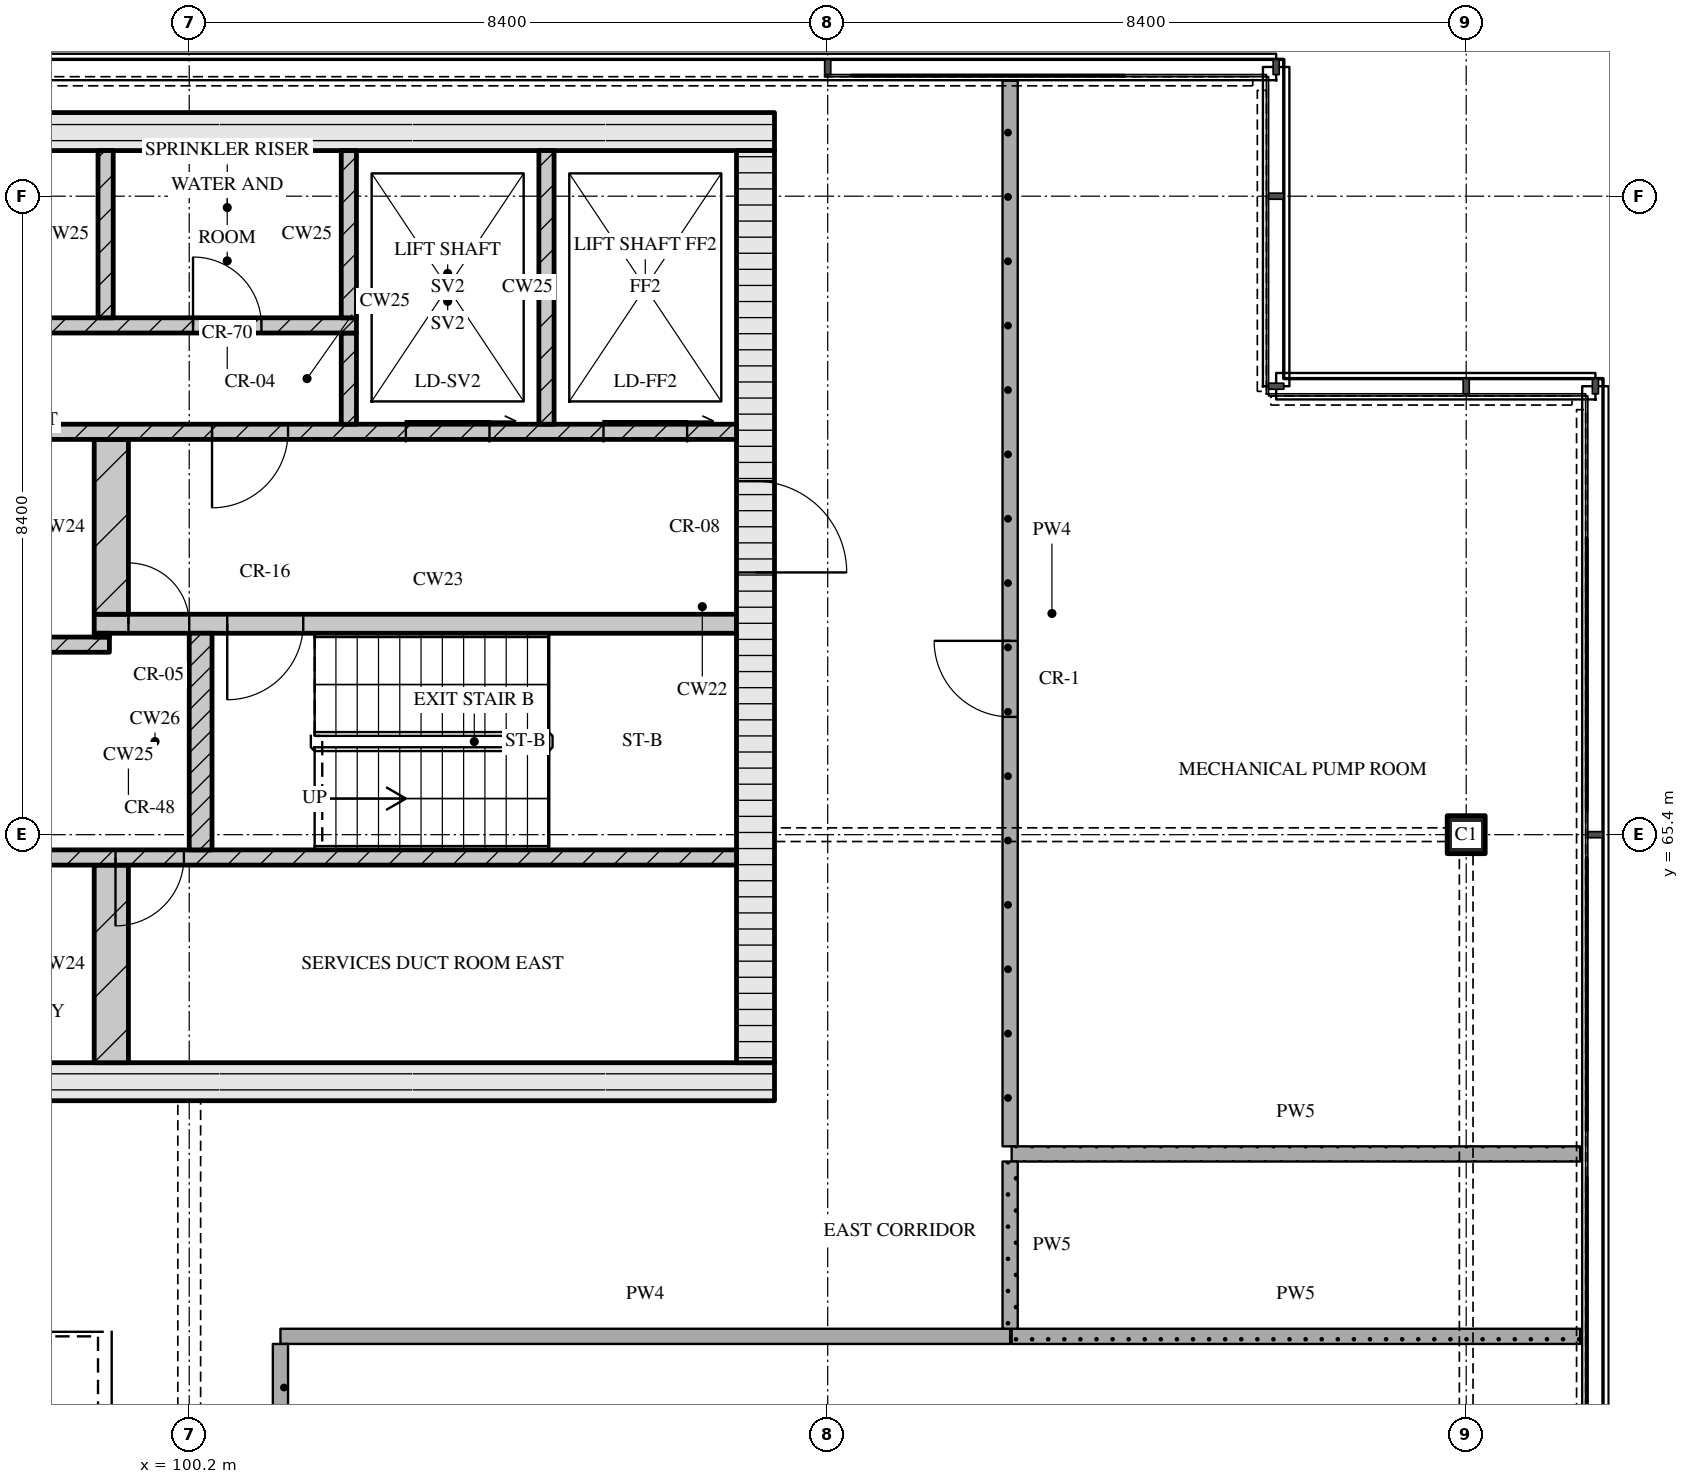
"""IFC4 building model, lengths in metres.
Left out: names, types, materials, properties, quantities, classifications, styles, units other than length and angle.
Written with IfcOpenShell. Run it as: python <this file> out.ifc"""

import sys

from ifc_helpers import new_model, si_unit, direction, frame, frame_2d, origin, origin_2d, place, context, subcontext, project, spatial, rectangle, extrude, element, fill, save


model = new_model("IFC4")
c1 = context("Model", 3, precision=1e-05, world=origin(), true_north=direction((0.0, 1.0)))
c2 = subcontext(c1, "Body", "Model", "MODEL_VIEW")
j1 = project(units=[si_unit("LENGTHUNIT", "METRE"), si_unit("PLANEANGLEUNIT", "RADIAN")], contexts=[c1])
p1 = place(None, origin())
s1 = spatial("IfcSite", under=j1, at=p1, CompositionType="ELEMENT")
p2 = place(p1, origin())
s2 = spatial("IfcBuilding", under=s1, at=p2, CompositionType="ELEMENT")
p3 = place(p2, frame((0.0, 0.0, 310.35)))
s3 = spatial("IfcBuildingStorey", under=s2, at=p3, CompositionType="ELEMENT", Elevation=310.35)
p4 = place(p3, frame((117.0, 65.4, 0.0), z_axis=(0.0, 0.0, 1.0), x_axis=(1.0, 0.0, 0.0)))
e1 = element("IfcColumn", 1, at=p4, inside=s3, PredefinedType="COLUMN", context=c2, shape_type="SweptSolid", body=[
    extrude(rectangle(XDim=0.5, YDim=0.5, at=origin_2d()), origin(), (0.0, 0.0, 1.0), 4.5),
])
p5 = place(p3, frame((67.3, 62.15, 0.0), z_axis=(0.0, 0.0, 1.0), x_axis=(1.0, 0.0, 0.0)))
e2 = element("IfcWall", 2, at=p5, inside=s3, PredefinedType="SOLIDWALL", context=c2, shape_type="SweptSolid", body=[
    extrude(rectangle(XDim=40.6, YDim=0.5, at=frame_2d((20.3, 0.0))), origin(), (0.0, 0.0, 1.0), 4.2),
])
p6 = place(p5, frame((20.65, 0.0, 0.0)))
e3 = element("IfcOpeningElement", 3, at=p6, cuts=e2, PredefinedType="OPENING", context=c2, shape_type="SweptSolid", body=[
    extrude(rectangle(XDim=1.8, YDim=2.1, at=frame_2d((0.9, 1.05))), frame((0.0, 0.26, 0.0), z_axis=(0.0, -1.0, 0.0), x_axis=(1.0, 0.0, 0.0)), (0.0, 0.0, 1.0), 0.52),
])
p7 = place(p3, frame((67.3, 74.65, 0.0), z_axis=(0.0, 0.0, 1.0), x_axis=(1.0, 0.0, 0.0)))
e4 = element("IfcWall", 4, at=p7, inside=s3, PredefinedType="SOLIDWALL", context=c2, shape_type="SweptSolid", body=[
    extrude(rectangle(XDim=40.6, YDim=0.5, at=frame_2d((20.3, 0.0))), origin(), (0.0, 0.0, 1.0), 4.2),
])
p8 = place(p3, frame((107.65, 62.4, 0.0), z_axis=(0.0, 0.0, 1.0), x_axis=(0.0, 1.0, 0.0)))
e5 = element("IfcWall", 5, at=p8, inside=s3, PredefinedType="SOLIDWALL", context=c2, shape_type="SweptSolid", body=[
    extrude(rectangle(XDim=12.0, YDim=0.5, at=frame_2d((6.0, 0.0))), origin(), (0.0, 0.0, 1.0), 4.2),
])
p9 = place(p8, frame((6.45, 0.0, 0.0)))
e6 = element("IfcOpeningElement", 6, at=p9, cuts=e5, PredefinedType="OPENING", context=c2, shape_type="SweptSolid", body=[
    extrude(rectangle(XDim=1.2, YDim=2.1, at=frame_2d((0.6, 1.05))), frame((0.0, 0.26, 0.0), z_axis=(0.0, -1.0, 0.0), x_axis=(1.0, 0.0, 0.0)), (0.0, 0.0, 1.0), 0.52),
])
p10 = place(p3, frame((99.175, 62.4, 0.0), z_axis=(0.0, 0.0, 1.0), x_axis=(0.0, 1.0, 0.0)))
e7 = element("IfcWall", 7, at=p10, inside=s3, PredefinedType="SOLIDWALL", context=c2, shape_type="SweptSolid", body=[
    extrude(rectangle(XDim=2.6, YDim=0.45, at=frame_2d((1.3, 0.0))), origin(), (0.0, 0.0, 1.0), 4.2),
])
p11 = place(p3, frame((91.4, 65.1, 0.0), z_axis=(0.0, 0.0, 1.0), x_axis=(1.0, 0.0, 0.0)))
e8 = element("IfcWall", 8, at=p11, inside=s3, PredefinedType="SOLIDWALL", context=c2, shape_type="SweptSolid", body=[
    extrude(rectangle(XDim=16.0, YDim=0.2, at=frame_2d((8.0, 0.0))), origin(), (0.0, 0.0, 1.0), 4.2),
])
p12 = place(p11, frame((7.83, 0.0, 0.0)))
e9 = element("IfcOpeningElement", 9, at=p12, cuts=e8, PredefinedType="OPENING", context=c2, shape_type="SweptSolid", body=[
    extrude(rectangle(XDim=0.9, YDim=2.1, at=frame_2d((0.45, 1.05))), frame((0.0, 0.11, 0.0), z_axis=(0.0, -1.0, 0.0), x_axis=(1.0, 0.0, 0.0)), (0.0, 0.0, 1.0), 0.22),
])
p13 = place(p3, frame((100.35, 65.2, 0.0), z_axis=(0.0, 0.0, 1.0), x_axis=(0.0, 1.0, 0.0)))
e10 = element("IfcWall", 10, at=p13, inside=s3, PredefinedType="SOLIDWALL", context=c2, shape_type="SweptSolid", body=[
    extrude(rectangle(XDim=2.85, YDim=0.3, at=frame_2d((1.425, 0.0))), origin(), (0.0, 0.0, 1.0), 4.2),
])
p14 = place(p3, frame((76.05, 67.9, 0.0), z_axis=(0.0, 0.0, 1.0), x_axis=(1.0, 0.0, 0.0)))
e11 = element("IfcWall", 11, at=p14, inside=s3, PredefinedType="SOLIDWALL", context=c2, shape_type="SweptSolid", body=[
    extrude(rectangle(XDim=23.1, YDim=0.2, at=frame_2d((11.55, 0.0))), origin(), (0.0, 0.0, 1.0), 4.2),
])
p15 = place(p14, frame((1.95, 0.0, 0.0)))
e12 = element("IfcOpeningElement", 12, at=p15, cuts=e11, PredefinedType="OPENING", context=c2, shape_type="SweptSolid", body=[
    extrude(rectangle(XDim=0.9, YDim=2.1, at=frame_2d((0.45, 1.05))), frame((0.0, 0.11, 0.0), z_axis=(0.0, -1.0, 0.0), x_axis=(1.0, 0.0, 0.0)), (0.0, 0.0, 1.0), 0.22),
])
p16 = place(p14, frame((5.66, 0.0, 0.0)))
e13 = element("IfcOpeningElement", 13, at=p16, cuts=e11, PredefinedType="OPENING", context=c2, shape_type="SweptSolid", body=[
    extrude(rectangle(XDim=0.9, YDim=2.1, at=frame_2d((0.45, 1.05))), frame((0.0, 0.11, 0.0), z_axis=(0.0, -1.0, 0.0), x_axis=(1.0, 0.0, 0.0)), (0.0, 0.0, 1.0), 0.22),
])
p17 = place(p14, frame((9.7, 0.0, 0.0)))
e14 = element("IfcOpeningElement", 14, at=p17, cuts=e11, PredefinedType="OPENING", context=c2, shape_type="SweptSolid", body=[
    extrude(rectangle(XDim=0.9, YDim=2.1, at=frame_2d((0.45, 1.05))), frame((0.0, 0.11, 0.0), z_axis=(0.0, -1.0, 0.0), x_axis=(1.0, 0.0, 0.0)), (0.0, 0.0, 1.0), 0.22),
])
p18 = place(p14, frame((13.55, 0.0, 0.0)))
e15 = element("IfcOpeningElement", 15, at=p18, cuts=e11, PredefinedType="OPENING", context=c2, shape_type="SweptSolid", body=[
    extrude(rectangle(XDim=1.0, YDim=2.1, at=frame_2d((0.5, 1.05))), frame((0.0, 0.11, 0.0), z_axis=(0.0, -1.0, 0.0), x_axis=(1.0, 0.0, 0.0)), (0.0, 0.0, 1.0), 0.22),
])
p19 = place(p3, frame((98.95, 68.025, 0.0), z_axis=(0.0, 0.0, 1.0), x_axis=(1.0, 0.0, 0.0)))
e16 = element("IfcWall", 16, at=p19, inside=s3, PredefinedType="SOLIDWALL", context=c2, shape_type="SweptSolid", body=[
    extrude(rectangle(XDim=0.2, YDim=0.05, at=frame_2d((0.1, 0.0))), origin(), (0.0, 0.0, 1.0), 4.2),
])
p20 = place(p3, frame((98.95, 68.175, 0.0), z_axis=(0.0, 0.0, 1.0), x_axis=(1.0, 0.0, 0.0)))
e17 = element("IfcWall", 17, at=p20, inside=s3, PredefinedType="SOLIDWALL", context=c2, shape_type="SweptSolid", body=[
    extrude(rectangle(XDim=8.45, YDim=0.25, at=frame_2d((4.225, 0.0))), origin(), (0.0, 0.0, 1.0), 4.2),
])
p21 = place(p20, frame((0.45, 0.0, 0.0)))
e18 = element("IfcOpeningElement", 18, at=p21, cuts=e17, PredefinedType="OPENING", context=c2, shape_type="SweptSolid", body=[
    extrude(rectangle(XDim=0.8, YDim=2.1, at=frame_2d((0.4, 1.05))), frame((0.0, 0.135, 0.0), z_axis=(0.0, -1.0, 0.0), x_axis=(1.0, 0.0, 0.0)), (0.0, 0.0, 1.0), 0.27),
])
p22 = place(p20, frame((1.75, 0.0, 0.0)))
e19 = element("IfcOpeningElement", 19, at=p22, cuts=e17, PredefinedType="OPENING", context=c2, shape_type="SweptSolid", body=[
    extrude(rectangle(XDim=1.0, YDim=2.1, at=frame_2d((0.5, 1.05))), frame((0.0, 0.135, 0.0), z_axis=(0.0, -1.0, 0.0), x_axis=(1.0, 0.0, 0.0)), (0.0, 0.0, 1.0), 0.27),
])
p23 = place(p3, frame((99.175, 68.3, 0.0), z_axis=(0.0, 0.0, 1.0), x_axis=(0.0, 1.0, 0.0)))
e20 = element("IfcWall", 20, at=p23, inside=s3, PredefinedType="SOLIDWALL", context=c2, shape_type="SweptSolid", body=[
    extrude(rectangle(XDim=2.3, YDim=0.45, at=frame_2d((1.15, 0.0))), origin(), (0.0, 0.0, 1.0), 4.2),
])
p24 = place(p3, frame((67.8, 70.7, 0.0), z_axis=(0.0, 0.0, 1.0), x_axis=(1.0, 0.0, 0.0)))
e21 = element("IfcWall", 21, at=p24, inside=s3, PredefinedType="SOLIDWALL", context=c2, shape_type="SweptSolid", body=[
    extrude(rectangle(XDim=39.6, YDim=0.2, at=frame_2d((19.8, 0.0))), origin(), (0.0, 0.0, 1.0), 4.2),
])
p25 = place(p24, frame((0.65, 0.0, 0.0)))
e22 = element("IfcOpeningElement", 22, at=p25, cuts=e21, PredefinedType="OPENING", context=c2, shape_type="SweptSolid", body=[
    extrude(rectangle(XDim=1.1, YDim=2.1, at=frame_2d((0.55, 1.05))), frame((0.0, 0.11, 0.0), z_axis=(0.0, -1.0, 0.0), x_axis=(1.0, 0.0, 0.0)), (0.0, 0.0, 1.0), 0.22),
])
p26 = place(p24, frame((3.25, 0.0, 0.0)))
e23 = element("IfcOpeningElement", 23, at=p26, cuts=e21, PredefinedType="OPENING", context=c2, shape_type="SweptSolid", body=[
    extrude(rectangle(XDim=1.1, YDim=2.1, at=frame_2d((0.55, 1.05))), frame((0.0, 0.11, 0.0), z_axis=(0.0, -1.0, 0.0), x_axis=(1.0, 0.0, 0.0)), (0.0, 0.0, 1.0), 0.22),
])
p27 = place(p24, frame((5.9, 0.0, 0.0)))
e24 = element("IfcOpeningElement", 24, at=p27, cuts=e21, PredefinedType="OPENING", context=c2, shape_type="SweptSolid", body=[
    extrude(rectangle(XDim=1.0, YDim=2.1, at=frame_2d((0.5, 1.05))), frame((0.0, 0.11, 0.0), z_axis=(0.0, -1.0, 0.0), x_axis=(1.0, 0.0, 0.0)), (0.0, 0.0, 1.0), 0.22),
])
p28 = place(p24, frame((21.7, 0.0, 0.0)))
e25 = element("IfcOpeningElement", 25, at=p28, cuts=e21, PredefinedType="OPENING", context=c2, shape_type="SweptSolid", body=[
    extrude(rectangle(XDim=1.0, YDim=2.1, at=frame_2d((0.5, 1.05))), frame((0.0, 0.11, 0.0), z_axis=(0.0, -1.0, 0.0), x_axis=(1.0, 0.0, 0.0)), (0.0, 0.0, 1.0), 0.22),
])
p29 = place(p24, frame((32.7, 0.0, 0.0)))
e26 = element("IfcOpeningElement", 26, at=p29, cuts=e21, PredefinedType="OPENING", context=c2, shape_type="SweptSolid", body=[
    extrude(rectangle(XDim=1.0, YDim=2.1, at=frame_2d((0.5, 1.05))), frame((0.0, 0.11, 0.0), z_axis=(0.0, -1.0, 0.0), x_axis=(1.0, 0.0, 0.0)), (0.0, 0.0, 1.0), 0.22),
])
p30 = place(p24, frame((35.25, 0.0, 0.0)))
e27 = element("IfcOpeningElement", 27, at=p30, cuts=e21, PredefinedType="OPENING", context=c2, shape_type="SweptSolid", body=[
    extrude(rectangle(XDim=1.1, YDim=2.1, at=frame_2d((0.55, 1.05))), frame((0.0, 0.11, 0.0), z_axis=(0.0, -1.0, 0.0), x_axis=(1.0, 0.0, 0.0)), (0.0, 0.0, 1.0), 0.22),
])
p31 = place(p24, frame((37.85, 0.0, 0.0)))
e28 = element("IfcOpeningElement", 28, at=p31, cuts=e21, PredefinedType="OPENING", context=c2, shape_type="SweptSolid", body=[
    extrude(rectangle(XDim=1.1, YDim=2.1, at=frame_2d((0.55, 1.05))), frame((0.0, 0.11, 0.0), z_axis=(0.0, -1.0, 0.0), x_axis=(1.0, 0.0, 0.0)), (0.0, 0.0, 1.0), 0.22),
])
p32 = place(p3, frame((102.3, 70.8, 0.0), z_axis=(0.0, 0.0, 1.0), x_axis=(0.0, 1.0, 0.0)))
e29 = element("IfcWall", 29, at=p32, inside=s3, PredefinedType="SOLIDWALL", context=c2, shape_type="SweptSolid", body=[
    extrude(rectangle(XDim=1.2, YDim=0.2, at=frame_2d((0.6, 0.0))), origin(), (0.0, 0.0, 1.0), 4.2),
])
p33 = place(p3, frame((104.9, 70.8, 0.0), z_axis=(0.0, 0.0, 1.0), x_axis=(0.0, 1.0, 0.0)))
e30 = element("IfcWall", 30, at=p33, inside=s3, PredefinedType="SOLIDWALL", context=c2, shape_type="SweptSolid", body=[
    extrude(rectangle(XDim=3.6, YDim=0.2, at=frame_2d((1.8, 0.0))), origin(), (0.0, 0.0, 1.0), 4.2),
])
p34 = place(p3, frame((90.7, 72.1, 0.0), z_axis=(0.0, 0.0, 1.0), x_axis=(1.0, 0.0, 0.0)))
e31 = element("IfcWall", 31, at=p34, inside=s3, PredefinedType="SOLIDWALL", context=c2, shape_type="SweptSolid", body=[
    extrude(rectangle(XDim=11.7, YDim=0.2, at=frame_2d((5.85, 0.0))), origin(), (0.0, 0.0, 1.0), 4.2),
])
p35 = place(p34, frame((4.175, 0.0, 0.0)))
e32 = element("IfcOpeningElement", 32, at=p35, cuts=e31, PredefinedType="OPENING", context=c2, shape_type="SweptSolid", body=[
    extrude(rectangle(XDim=0.9, YDim=2.1, at=frame_2d((0.45, 1.05))), frame((0.0, 0.11, 0.0), z_axis=(0.0, -1.0, 0.0), x_axis=(1.0, 0.0, 0.0)), (0.0, 0.0, 1.0), 0.22),
])
p36 = place(p34, frame((9.55, 0.0, 0.0)))
e33 = element("IfcOpeningElement", 33, at=p36, cuts=e31, PredefinedType="OPENING", context=c2, shape_type="SweptSolid", body=[
    extrude(rectangle(XDim=0.9, YDim=2.1, at=frame_2d((0.45, 1.05))), frame((0.0, 0.11, 0.0), z_axis=(0.0, -1.0, 0.0), x_axis=(1.0, 0.0, 0.0)), (0.0, 0.0, 1.0), 0.22),
])
for number, where, z_axis, x_axis in (
    (34, (99.1, 72.2, 0.0), (0.0, 0.0, 1.0), (0.0, 1.0, 0.0)),
    (35, (102.3, 72.2, 0.0), (0.0, 0.0, 1.0), (0.0, 1.0, 0.0)),
):
    element("IfcWall", number, at=place(p3, frame(where, z_axis=z_axis, x_axis=x_axis)), inside=s3, PredefinedType="SOLIDWALL", context=c2, shape_type="SweptSolid", body=[
        extrude(rectangle(XDim=2.2, YDim=0.2, at=frame_2d((1.1, 0.0))), origin(), (0.0, 0.0, 1.0), 4.2),
    ])
p37 = place(p3, frame((111.02, 58.8, 0.0), z_axis=(0.0, 0.0, 1.0), x_axis=(1.0, 0.0, 0.0)))
e36 = element("IfcWall", 36, at=p37, inside=s3, PredefinedType="PARTITIONING", context=c2, shape_type="SweptSolid", body=[
    extrude(rectangle(XDim=7.48, YDim=0.2, at=frame_2d((3.74, 0.0))), origin(), (0.0, 0.0, 1.0), 4.2),
])
p38 = place(p3, frame((101.4, 58.8, 0.0), z_axis=(0.0, 0.0, 1.0), x_axis=(1.0, 0.0, 0.0)))
e37 = element("IfcWall", 37, at=p38, inside=s3, PredefinedType="PARTITIONING", context=c2, shape_type="SweptSolid", body=[
    extrude(rectangle(XDim=9.6, YDim=0.2, at=frame_2d((4.8, 0.0))), origin(), (0.0, 0.0, 1.0), 4.2),
])
p39 = place(p3, frame((111.02, 61.2, 0.0), z_axis=(0.0, 0.0, 1.0), x_axis=(1.0, 0.0, 0.0)))
e38 = element("IfcWall", 38, at=p39, inside=s3, PredefinedType="PARTITIONING", context=c2, shape_type="SweptSolid", body=[
    extrude(rectangle(XDim=7.48, YDim=0.2, at=frame_2d((3.74, 0.0))), origin(), (0.0, 0.0, 1.0), 4.2),
])
p40 = place(p3, frame((101.4, 58.7, 0.0), z_axis=(0.0, 0.0, 1.0), x_axis=(0.0, -1.0, 0.0)))
e39 = element("IfcWall", 39, at=p40, inside=s3, PredefinedType="PARTITIONING", context=c2, shape_type="SweptSolid", body=[
    extrude(rectangle(XDim=6.1, YDim=0.2, at=frame_2d((3.05, 0.0))), origin(), (0.0, 0.0, 1.0), 4.2),
])
p41 = place(p40, frame((2.55, 0.0, 0.0)))
e40 = element("IfcOpeningElement", 40, at=p41, cuts=e39, PredefinedType="OPENING", context=c2, shape_type="SweptSolid", body=[
    extrude(rectangle(XDim=1.0, YDim=2.1, at=frame_2d((0.5, 1.05))), frame((0.0, 0.11, 0.0), z_axis=(0.0, -1.0, 0.0), x_axis=(1.0, 0.0, 0.0)), (0.0, 0.0, 1.0), 0.22),
])
p42 = place(p3, frame((111.0, 61.1, 0.0), z_axis=(0.0, 0.0, 1.0), x_axis=(0.0, -1.0, 0.0)))
e41 = element("IfcWall", 41, at=p42, inside=s3, PredefinedType="PARTITIONING", context=c2, shape_type="SweptSolid", body=[
    extrude(rectangle(XDim=2.2, YDim=0.2, at=frame_2d((1.1, 0.0))), origin(), (0.0, 0.0, 1.0), 4.2),
])
p43 = place(p3, frame((111.0, 75.32, 0.0), z_axis=(0.0, 0.0, 1.0), x_axis=(0.0, -1.0, 0.0)))
e42 = element("IfcWall", 42, at=p43, inside=s3, PredefinedType="PARTITIONING", context=c2, shape_type="SweptSolid", body=[
    extrude(rectangle(XDim=14.02, YDim=0.2, at=frame_2d((7.01, 0.0))), origin(), (0.0, 0.0, 1.0), 4.2),
])
p44 = place(p43, frame((7.37, 0.0, 0.0)))
e43 = element("IfcOpeningElement", 43, at=p44, cuts=e42, PredefinedType="OPENING", context=c2, shape_type="SweptSolid", body=[
    extrude(rectangle(XDim=1.0, YDim=2.1, at=frame_2d((0.5, 1.05))), frame((0.0, 0.11, 0.0), z_axis=(0.0, -1.0, 0.0), x_axis=(1.0, 0.0, 0.0)), (0.0, 0.0, 1.0), 0.22),
])
p45 = place(p12, origin())
e44 = element("IfcDoor", 44, at=p45, inside=s3, OperationType="SINGLE_SWING_RIGHT", PredefinedType="DOOR", context=c2, shape_type="SweptSolid", body=[
    extrude(rectangle(XDim=0.9, YDim=2.1, at=frame_2d((0.45, 1.05))), frame((0.0, 0.025, 0.0), z_axis=(0.0, -1.0, 0.0), x_axis=(1.0, 0.0, 0.0)), (0.0, 0.0, 1.0), 0.05),
])
fill(e9, e44)
p46 = place(p21, origin())
e45 = element("IfcDoor", 45, at=p46, inside=s3, OperationType="SINGLE_SWING_LEFT", PredefinedType="DOOR", context=c2, shape_type="SweptSolid", body=[
    extrude(rectangle(XDim=0.8, YDim=2.1, at=frame_2d((0.4, 1.05))), frame((0.0, 0.025, 0.0), z_axis=(0.0, -1.0, 0.0), x_axis=(1.0, 0.0, 0.0)), (0.0, 0.0, 1.0), 0.05),
])
fill(e18, e45)
p47 = place(p22, origin())
e46 = element("IfcDoor", 46, at=p47, inside=s3, OperationType="SINGLE_SWING_RIGHT", PredefinedType="DOOR", context=c2, shape_type="SweptSolid", body=[
    extrude(rectangle(XDim=1.0, YDim=2.1, at=frame_2d((0.5, 1.05))), frame((0.0, 0.025, 0.0), z_axis=(0.0, -1.0, 0.0), x_axis=(1.0, 0.0, 0.0)), (0.0, 0.0, 1.0), 0.05),
])
fill(e19, e46)
p48 = place(p9, origin())
e47 = element("IfcDoor", 47, at=p48, inside=s3, OperationType="SINGLE_SWING_RIGHT", PredefinedType="DOOR", context=c2, shape_type="SweptSolid", body=[
    extrude(rectangle(XDim=1.2, YDim=2.1, at=frame_2d((0.6, 1.05))), frame((0.0, 0.025, 0.0), z_axis=(0.0, -1.0, 0.0), x_axis=(1.0, 0.0, 0.0)), (0.0, 0.0, 1.0), 0.05),
])
fill(e6, e47)
p49 = place(p29, origin())
e48 = element("IfcDoor", 48, at=p49, inside=s3, OperationType="SINGLE_SWING_RIGHT", PredefinedType="DOOR", context=c2, shape_type="SweptSolid", body=[
    extrude(rectangle(XDim=1.0, YDim=2.1, at=frame_2d((0.5, 1.05))), frame((0.0, 0.025, 0.0), z_axis=(0.0, -1.0, 0.0), x_axis=(1.0, 0.0, 0.0)), (0.0, 0.0, 1.0), 0.05),
])
fill(e26, e48)
p50 = place(p30, origin())
e49 = element("IfcDoor", 49, at=p50, inside=s3, OperationType="SLIDING_TO_RIGHT", PredefinedType="DOOR", context=c2, shape_type="SweptSolid", body=[
    extrude(rectangle(XDim=1.1, YDim=2.1, at=frame_2d((0.55, 1.05))), frame((0.0, 0.025, 0.0), z_axis=(0.0, -1.0, 0.0), x_axis=(1.0, 0.0, 0.0)), (0.0, 0.0, 1.0), 0.05),
])
fill(e27, e49)
p51 = place(p31, origin())
e50 = element("IfcDoor", 50, at=p51, inside=s3, OperationType="SLIDING_TO_RIGHT", PredefinedType="DOOR", context=c2, shape_type="SweptSolid", body=[
    extrude(rectangle(XDim=1.1, YDim=2.1, at=frame_2d((0.55, 1.05))), frame((0.0, 0.025, 0.0), z_axis=(0.0, -1.0, 0.0), x_axis=(1.0, 0.0, 0.0)), (0.0, 0.0, 1.0), 0.05),
])
fill(e28, e50)
p52 = place(p36, origin())
e51 = element("IfcDoor", 51, at=p52, inside=s3, OperationType="SINGLE_SWING_LEFT", PredefinedType="DOOR", context=c2, shape_type="SweptSolid", body=[
    extrude(rectangle(XDim=0.9, YDim=2.1, at=frame_2d((0.45, 1.05))), frame((0.0, 0.025, 0.0), z_axis=(0.0, -1.0, 0.0), x_axis=(1.0, 0.0, 0.0)), (0.0, 0.0, 1.0), 0.05),
])
fill(e33, e51)
p53 = place(p44, origin())
e52 = element("IfcDoor", 52, at=p53, inside=s3, OperationType="SINGLE_SWING_RIGHT", PredefinedType="DOOR", context=c2, shape_type="SweptSolid", body=[
    extrude(rectangle(XDim=1.0, YDim=2.1, at=frame_2d((0.5, 1.05))), frame((0.0, 0.025, 0.0), z_axis=(0.0, -1.0, 0.0), x_axis=(1.0, 0.0, 0.0)), (0.0, 0.0, 1.0), 0.05),
])
fill(e43, e52)
save(model, sys.argv[1])
